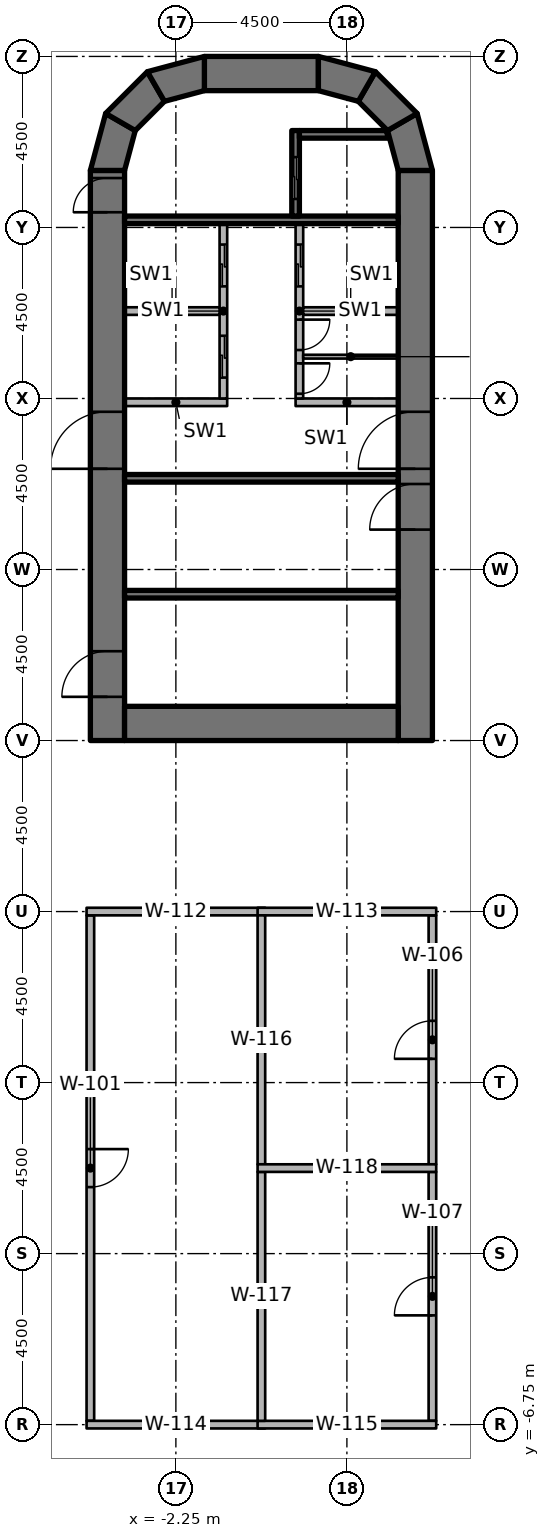
"""IFC4 building model, lengths in metres.
Left out: names, types, materials, properties, quantities, classifications, styles, units other than length and angle.
Written with IfcOpenShell. Run it as: python <this file> out.ifc"""

import sys

from ifc_helpers import new_model, si_unit, direction, frame, frame_2d, origin, place, context, subcontext, project, spatial, polyline, rectangle, outline, extrude, element, fill, save


model = new_model("IFC4")
c1 = context("Model", 3, precision=1e-05, world=origin(), true_north=direction((0.0, 1.0)))
c2 = subcontext(c1, "Body", "Model", "MODEL_VIEW")
j1 = project(units=[si_unit("LENGTHUNIT", "METRE"), si_unit("PLANEANGLEUNIT", "RADIAN")], contexts=[c1])
p1 = place(None, origin())
s1 = spatial("IfcSite", under=j1, at=p1, CompositionType="ELEMENT")
p2 = place(p1, origin())
s2 = spatial("IfcBuilding", under=s1, at=p2, CompositionType="ELEMENT")
p3 = place(p2, frame((0.0, 0.0, 27.0)))
s3 = spatial("IfcBuildingStorey", under=s2, at=p3, CompositionType="ELEMENT", Elevation=27.0)
p4 = place(p3, frame((-4.05, 11.25, 0.0), z_axis=(0.0, 0.0, 1.0), x_axis=(0.0, 1.0, 0.0)))
e1 = element("IfcWall", 1, at=p4, inside=s3, PredefinedType="SHEAR", context=c2, shape_type="SweptSolid", body=[
    extrude(rectangle(XDim=15.0, YDim=0.9, at=frame_2d((7.5, 0.0))), origin(), (0.0, 0.0, 1.0), 4.2),
])
p5 = place(p4, frame((7.15, 0.0, 0.0)))
e2 = element("IfcOpeningElement", 2, at=p5, cuts=e1, PredefinedType="OPENING", context=c2, shape_type="SweptSolid", body=[
    extrude(rectangle(XDim=1.5, YDim=2.3, at=frame_2d((0.75, 1.15))), frame((0.0, 0.46, 0.0), z_axis=(0.0, -1.0, 0.0), x_axis=(1.0, 0.0, 0.0)), (0.0, 0.0, 1.0), 0.92),
])
p6 = place(p4, frame((13.9, 0.0, 0.0)))
e3 = element("IfcOpeningElement", 3, at=p6, cuts=e1, PredefinedType="OPENING", context=c2, shape_type="SweptSolid", body=[
    extrude(rectangle(XDim=0.9, YDim=2.1, at=frame_2d((0.45, 1.05))), frame((0.0, 0.46, 0.0), z_axis=(0.0, -1.0, 0.0), x_axis=(1.0, 0.0, 0.0)), (0.0, 0.0, 1.0), 0.92),
])
p7 = place(p4, frame((1.15, 0.0, 0.0)))
e4 = element("IfcOpeningElement", 4, at=p7, cuts=e1, PredefinedType="OPENING", context=c2, shape_type="SweptSolid", body=[
    extrude(rectangle(XDim=1.2, YDim=2.1, at=frame_2d((0.6, 1.05))), frame((0.0, 0.46, 0.0), z_axis=(0.0, -1.0, 0.0), x_axis=(1.0, 0.0, 0.0)), (0.0, 0.0, 1.0), 0.92),
])
p8 = place(p3, frame((4.05, 11.25, 0.0), z_axis=(0.0, 0.0, 1.0), x_axis=(0.0, 1.0, 0.0)))
e5 = element("IfcWall", 5, at=p8, inside=s3, PredefinedType="SHEAR", context=c2, shape_type="SweptSolid", body=[
    extrude(rectangle(XDim=15.0, YDim=0.9, at=frame_2d((7.5, 0.0))), origin(), (0.0, 0.0, 1.0), 4.2),
])
p9 = place(p8, frame((7.15, 0.0, 0.0)))
e6 = element("IfcOpeningElement", 6, at=p9, cuts=e5, PredefinedType="OPENING", context=c2, shape_type="SweptSolid", body=[
    extrude(rectangle(XDim=1.5, YDim=2.3, at=frame_2d((0.75, 1.15))), frame((0.0, 0.46, 0.0), z_axis=(0.0, -1.0, 0.0), x_axis=(1.0, 0.0, 0.0)), (0.0, 0.0, 1.0), 0.92),
])
p10 = place(p8, frame((5.55, 0.0, 0.0)))
e7 = element("IfcOpeningElement", 7, at=p10, cuts=e5, PredefinedType="OPENING", context=c2, shape_type="SweptSolid", body=[
    extrude(rectangle(XDim=1.2, YDim=2.1, at=frame_2d((0.6, 1.05))), frame((0.0, 0.46, 0.0), z_axis=(0.0, -1.0, 0.0), x_axis=(1.0, 0.0, 0.0)), (0.0, 0.0, 1.0), 0.92),
])
p11 = place(p3, frame((-3.6, 11.7, 0.0), z_axis=(0.0, 0.0, 1.0), x_axis=(1.0, 0.0, 0.0)))
e8 = element("IfcWall", 8, at=p11, inside=s3, PredefinedType="SHEAR", context=c2, shape_type="SweptSolid", body=[
    extrude(rectangle(XDim=7.2, YDim=0.9, at=frame_2d((3.6, 0.0))), origin(), (0.0, 0.0, 1.0), 4.2),
])
p12 = place(p3, frame((-1.5, 28.8, 0.0), z_axis=(0.0, 0.0, 1.0), x_axis=(1.0, 0.0, 0.0)))
e9 = element("IfcWall", 9, at=p12, inside=s3, PredefinedType="SHEAR", context=c2, shape_type="SweptSolid", body=[
    extrude(rectangle(XDim=3.0, YDim=0.9, at=frame_2d((1.5, 0.0))), origin(), (0.0, 0.0, 1.0), 4.2),
])
p13 = place(p3, origin())
e10 = element("IfcWall", 10, at=p13, inside=s3, PredefinedType="SHEAR", context=c2, shape_type="SweptSolid", body=[
    extrude(outline(polyline([(-4.5, 26.25), (-4.098, 27.75), (-3.319, 27.3), (-3.6, 26.25), (-4.5, 26.25)])), origin(), (0.0, 0.0, 1.0), 4.2),
])
p14 = place(p3, origin())
e11 = element("IfcWall", 11, at=p14, inside=s3, PredefinedType="SHEAR", context=c2, shape_type="SweptSolid", body=[
    extrude(outline(polyline([(-4.098, 27.75), (-3.0, 28.848), (-2.55, 28.069), (-3.319, 27.3), (-4.098, 27.75)])), origin(), (0.0, 0.0, 1.0), 4.2),
])
p15 = place(p3, origin())
e12 = element("IfcWall", 12, at=p15, inside=s3, PredefinedType="SHEAR", context=c2, shape_type="SweptSolid", body=[
    extrude(outline(polyline([(-3.0, 28.848), (-1.5, 29.25), (-1.5, 28.35), (-2.55, 28.069), (-3.0, 28.848)])), origin(), (0.0, 0.0, 1.0), 4.2),
])
p16 = place(p3, origin())
e13 = element("IfcWall", 13, at=p16, inside=s3, PredefinedType="SHEAR", context=c2, shape_type="SweptSolid", body=[
    extrude(outline(polyline([(4.5, 26.25), (4.098, 27.75), (3.319, 27.3), (3.6, 26.25), (4.5, 26.25)])), origin(), (0.0, 0.0, 1.0), 4.2),
])
p17 = place(p3, origin())
e14 = element("IfcWall", 14, at=p17, inside=s3, PredefinedType="SHEAR", context=c2, shape_type="SweptSolid", body=[
    extrude(outline(polyline([(4.098, 27.75), (3.0, 28.848), (2.55, 28.069), (3.319, 27.3), (4.098, 27.75)])), origin(), (0.0, 0.0, 1.0), 4.2),
])
p18 = place(p3, origin())
e15 = element("IfcWall", 15, at=p18, inside=s3, PredefinedType="SHEAR", context=c2, shape_type="SweptSolid", body=[
    extrude(outline(polyline([(3.0, 28.848), (1.5, 29.25), (1.5, 28.35), (2.55, 28.069), (3.0, 28.848)])), origin(), (0.0, 0.0, 1.0), 4.2),
])
p19 = place(p3, frame((-3.6, 24.95, 0.0), z_axis=(0.0, 0.0, 1.0), x_axis=(1.0, 0.0, 0.0)))
e16 = element("IfcWall", 16, at=p19, inside=s3, PredefinedType="SHEAR", context=c2, shape_type="SweptSolid", body=[
    extrude(rectangle(XDim=7.2, YDim=0.2, at=frame_2d((3.6, 0.0))), origin(), (0.0, 0.0, 1.0), 4.05),
])
p20 = place(p3, frame((0.9, 27.3, 0.0), z_axis=(0.0, 0.0, 1.0), x_axis=(0.0, -1.0, 0.0)))
e17 = element("IfcWall", 17, at=p20, inside=s3, PredefinedType="SHEAR", context=c2, shape_type="SweptSolid", body=[
    extrude(rectangle(XDim=2.25, YDim=0.2, at=frame_2d((1.125, 0.0))), origin(), (0.0, 0.0, 1.0), 4.05),
])
p21 = place(p20, frame((0.7, 0.0, 0.0)))
e18 = element("IfcOpeningElement", 18, at=p21, cuts=e17, PredefinedType="OPENING", context=c2, shape_type="SweptSolid", body=[
    extrude(rectangle(XDim=1.1, YDim=2.3, at=frame_2d((0.55, 1.15))), frame((0.0, 0.11, 0.0), z_axis=(0.0, -1.0, 0.0), x_axis=(1.0, 0.0, 0.0)), (0.0, 0.0, 1.0), 0.22),
])
p22 = place(p3, origin())
e19 = element("IfcWall", 19, at=p22, inside=s3, PredefinedType="SHEAR", context=c2, shape_type="SweptSolid", body=[
    extrude(outline(polyline([(1.0, 27.1), (3.341, 27.1), (3.291, 27.284), (3.275, 27.3), (1.0, 27.3), (1.0, 27.1)])), origin(), (0.0, 0.0, 1.0), 4.05),
])
for number, where, z_axis, x_axis in (
    (20, (-3.6, 18.15, 0.0), (0.0, 0.0, 1.0), (1.0, 0.0, 0.0)),
    (21, (-3.6, 15.1, 0.0), (0.0, 0.0, 1.0), (1.0, 0.0, 0.0)),
):
    element("IfcWall", number, at=place(p3, frame(where, z_axis=z_axis, x_axis=x_axis)), inside=s3, PredefinedType="SHEAR", context=c2, shape_type="SweptSolid", body=[
        extrude(rectangle(XDim=7.2, YDim=0.2, at=frame_2d((3.6, 0.0))), origin(), (0.0, 0.0, 1.0), 4.05),
    ])
p23 = place(p3, frame((-3.6, 20.15, 0.0), z_axis=(0.0, 0.0, 1.0), x_axis=(1.0, 0.0, 0.0)))
e22 = element("IfcWall", 22, at=p23, inside=s3, PredefinedType="PARTITIONING", context=c2, shape_type="SweptSolid", body=[
    extrude(rectangle(XDim=2.7, YDim=0.2, at=frame_2d((1.35, 0.0))), origin(), (0.0, 0.0, 1.0), 4.05),
])
p24 = place(p3, frame((-1.0, 24.85, 0.0), z_axis=(0.0, 0.0, 1.0), x_axis=(0.0, -1.0, 0.0)))
e23 = element("IfcWall", 23, at=p24, inside=s3, PredefinedType="PARTITIONING", context=c2, shape_type="SweptSolid", body=[
    extrude(rectangle(XDim=4.6, YDim=0.2, at=frame_2d((2.3, 0.0))), origin(), (0.0, 0.0, 1.0), 4.05),
])
p25 = place(p24, frame((0.55, 0.0, 0.0)))
e24 = element("IfcOpeningElement", 24, at=p25, cuts=e23, PredefinedType="OPENING", context=c2, shape_type="SweptSolid", body=[
    extrude(rectangle(XDim=1.1, YDim=2.3, at=frame_2d((0.55, 1.15))), frame((0.0, 0.11, 0.0), z_axis=(0.0, -1.0, 0.0), x_axis=(1.0, 0.0, 0.0)), (0.0, 0.0, 1.0), 0.22),
])
p26 = place(p24, frame((2.95, 0.0, 0.0)))
e25 = element("IfcOpeningElement", 25, at=p26, cuts=e23, PredefinedType="OPENING", context=c2, shape_type="SweptSolid", body=[
    extrude(rectangle(XDim=1.1, YDim=2.3, at=frame_2d((0.55, 1.15))), frame((0.0, 0.11, 0.0), z_axis=(0.0, -1.0, 0.0), x_axis=(1.0, 0.0, 0.0)), (0.0, 0.0, 1.0), 0.22),
])
p27 = place(p3, frame((0.9, 20.15, 0.0), z_axis=(0.0, 0.0, 1.0), x_axis=(1.0, 0.0, 0.0)))
e26 = element("IfcWall", 26, at=p27, inside=s3, PredefinedType="PARTITIONING", context=c2, shape_type="SweptSolid", body=[
    extrude(rectangle(XDim=2.7, YDim=0.2, at=frame_2d((1.35, 0.0))), origin(), (0.0, 0.0, 1.0), 4.05),
])
p28 = place(p3, frame((1.0, 24.85, 0.0), z_axis=(0.0, 0.0, 1.0), x_axis=(0.0, -1.0, 0.0)))
e27 = element("IfcWall", 27, at=p28, inside=s3, PredefinedType="PARTITIONING", context=c2, shape_type="SweptSolid", body=[
    extrude(rectangle(XDim=4.6, YDim=0.2, at=frame_2d((2.3, 0.0))), origin(), (0.0, 0.0, 1.0), 4.05),
])
p29 = place(p28, frame((0.55, 0.0, 0.0)))
e28 = element("IfcOpeningElement", 28, at=p29, cuts=e27, PredefinedType="OPENING", context=c2, shape_type="SweptSolid", body=[
    extrude(rectangle(XDim=1.1, YDim=2.3, at=frame_2d((0.55, 1.15))), frame((0.0, 0.11, 0.0), z_axis=(0.0, -1.0, 0.0), x_axis=(1.0, 0.0, 0.0)), (0.0, 0.0, 1.0), 0.22),
])
p30 = place(p28, frame((2.525, 0.0, 0.0)))
e29 = element("IfcOpeningElement", 29, at=p30, cuts=e27, PredefinedType="OPENING", context=c2, shape_type="SweptSolid", body=[
    extrude(rectangle(XDim=0.8, YDim=2.1, at=frame_2d((0.4, 1.05))), frame((0.0, 0.11, 0.0), z_axis=(0.0, -1.0, 0.0), x_axis=(1.0, 0.0, 0.0)), (0.0, 0.0, 1.0), 0.22),
])
p31 = place(p28, frame((3.675, 0.0, 0.0)))
e30 = element("IfcOpeningElement", 30, at=p31, cuts=e27, PredefinedType="OPENING", context=c2, shape_type="SweptSolid", body=[
    extrude(rectangle(XDim=0.8, YDim=2.1, at=frame_2d((0.4, 1.05))), frame((0.0, 0.11, 0.0), z_axis=(0.0, -1.0, 0.0), x_axis=(1.0, 0.0, 0.0)), (0.0, 0.0, 1.0), 0.22),
])
for number, where, z_axis, x_axis in (
    (31, (-3.6, 22.55, 0.0), (0.0, 0.0, 1.0), (1.0, 0.0, 0.0)),
    (32, (1.1, 22.55, 0.0), (0.0, 0.0, 1.0), (1.0, 0.0, 0.0)),
):
    element("IfcWall", number, at=place(p3, frame(where, z_axis=z_axis, x_axis=x_axis)), inside=s3, PredefinedType="PARTITIONING", context=c2, shape_type="SweptSolid", body=[
        extrude(rectangle(XDim=2.5, YDim=0.2, at=frame_2d((1.25, 0.0))), origin(), (0.0, 0.0, 1.0), 4.05),
    ])
p32 = place(p3, frame((1.1, 21.35, 0.0), z_axis=(0.0, 0.0, 1.0), x_axis=(1.0, 0.0, 0.0)))
e33 = element("IfcWall", 33, at=p32, inside=s3, PredefinedType="PARTITIONING", context=c2, shape_type="SweptSolid", body=[
    extrude(rectangle(XDim=2.5, YDim=0.1, at=frame_2d((1.25, 0.0))), origin(), (0.0, 0.0, 1.0), 4.05),
])
p33 = place(p3, frame((-4.5, 6.65, 0.0), z_axis=(0.0, 0.0, 1.0), x_axis=(0.0, -1.0, 0.0)))
e34 = element("IfcWall", 34, at=p33, inside=s3, PredefinedType="PARTITIONING", context=c2, shape_type="SweptSolid", body=[
    extrude(rectangle(XDim=13.3, YDim=0.2, at=frame_2d((6.65, 0.0))), origin(), (0.0, 0.0, 1.0), 3.131),
])
p34 = place(p33, frame((6.15, 0.0, 0.0)))
e35 = element("IfcOpeningElement", 35, at=p34, cuts=e34, PredefinedType="OPENING", context=c2, shape_type="SweptSolid", body=[
    extrude(rectangle(XDim=1.0, YDim=2.1, at=frame_2d((0.5, 1.05))), frame((0.0, 0.11, 0.0), z_axis=(0.0, -1.0, 0.0), x_axis=(1.0, 0.0, 0.0)), (0.0, 0.0, 1.0), 0.22),
])
p35 = place(p3, frame((4.5, 0.1, 0.0), z_axis=(0.0, 0.0, 1.0), x_axis=(0.0, 1.0, 0.0)))
e36 = element("IfcWall", 36, at=p35, inside=s3, PredefinedType="PARTITIONING", context=c2, shape_type="SweptSolid", body=[
    extrude(rectangle(XDim=6.55, YDim=0.2, at=frame_2d((3.275, 0.0))), origin(), (0.0, 0.0, 1.0), 3.131),
])
p36 = place(p35, frame((2.775, 0.0, 0.0)))
e37 = element("IfcOpeningElement", 37, at=p36, cuts=e36, PredefinedType="OPENING", context=c2, shape_type="SweptSolid", body=[
    extrude(rectangle(XDim=1.0, YDim=2.1, at=frame_2d((0.5, 1.05))), frame((0.0, 0.11, 0.0), z_axis=(0.0, -1.0, 0.0), x_axis=(1.0, 0.0, 0.0)), (0.0, 0.0, 1.0), 0.22),
])
p37 = place(p3, frame((4.5, -6.65, 0.0), z_axis=(0.0, 0.0, 1.0), x_axis=(0.0, 1.0, 0.0)))
e38 = element("IfcWall", 38, at=p37, inside=s3, PredefinedType="PARTITIONING", context=c2, shape_type="SweptSolid", body=[
    extrude(rectangle(XDim=6.55, YDim=0.2, at=frame_2d((3.275, 0.0))), origin(), (0.0, 0.0, 1.0), 3.131),
])
p38 = place(p37, frame((2.775, 0.0, 0.0)))
e39 = element("IfcOpeningElement", 39, at=p38, cuts=e38, PredefinedType="OPENING", context=c2, shape_type="SweptSolid", body=[
    extrude(rectangle(XDim=1.0, YDim=2.1, at=frame_2d((0.5, 1.05))), frame((0.0, 0.11, 0.0), z_axis=(0.0, -1.0, 0.0), x_axis=(1.0, 0.0, 0.0)), (0.0, 0.0, 1.0), 0.22),
])
for number, where, z_axis, x_axis in (
    (40, (-4.6, 6.75, 0.0), (0.0, 0.0, 1.0), (1.0, 0.0, 0.0)),
    (41, (-0.1, 6.75, 0.0), (0.0, 0.0, 1.0), (1.0, 0.0, 0.0)),
    (42, (-4.6, -6.75, 0.0), (0.0, 0.0, 1.0), (1.0, 0.0, 0.0)),
    (43, (-0.1, -6.75, 0.0), (0.0, 0.0, 1.0), (1.0, 0.0, 0.0)),
):
    element("IfcWall", number, at=place(p3, frame(where, z_axis=z_axis, x_axis=x_axis)), inside=s3, PredefinedType="PARTITIONING", context=c2, shape_type="SweptSolid", body=[
        extrude(rectangle(XDim=4.7, YDim=0.2, at=frame_2d((2.35, 0.0))), origin(), (0.0, 0.0, 1.0), 3.131),
    ])
for number, where, z_axis, x_axis in (
    (44, (0.0, 0.1, 0.0), (0.0, 0.0, 1.0), (0.0, 1.0, 0.0)),
    (45, (0.0, -6.65, 0.0), (0.0, 0.0, 1.0), (0.0, 1.0, 0.0)),
):
    element("IfcWall", number, at=place(p3, frame(where, z_axis=z_axis, x_axis=x_axis)), inside=s3, PredefinedType="PARTITIONING", context=c2, shape_type="SweptSolid", body=[
        extrude(rectangle(XDim=6.55, YDim=0.2, at=frame_2d((3.275, 0.0))), origin(), (0.0, 0.0, 1.0), 3.131),
    ])
p39 = place(p3, frame((-0.1, 0.0, 0.0), z_axis=(0.0, 0.0, 1.0), x_axis=(1.0, 0.0, 0.0)))
e46 = element("IfcWall", 46, at=p39, inside=s3, PredefinedType="PARTITIONING", context=c2, shape_type="SweptSolid", body=[
    extrude(rectangle(XDim=4.7, YDim=0.2, at=frame_2d((2.35, 0.0))), origin(), (0.0, 0.0, 1.0), 3.131),
])
p40 = place(p5, origin())
e47 = element("IfcDoor", 47, at=p40, inside=s3, OperationType="DOUBLE_DOOR_SINGLE_SWING", PredefinedType="DOOR", context=c2, shape_type="SweptSolid", body=[
    extrude(rectangle(XDim=1.5, YDim=2.3, at=frame_2d((0.75, 1.15))), frame((0.0, 0.025, 0.0), z_axis=(0.0, -1.0, 0.0), x_axis=(1.0, 0.0, 0.0)), (0.0, 0.0, 1.0), 0.05),
])
fill(e2, e47)
p41 = place(p9, origin())
e48 = element("IfcDoor", 48, at=p41, inside=s3, OperationType="DOUBLE_DOOR_SINGLE_SWING", PredefinedType="DOOR", context=c2, shape_type="SweptSolid", body=[
    extrude(rectangle(XDim=1.5, YDim=2.3, at=frame_2d((0.75, 1.15))), frame((0.0, 0.025, 0.0), z_axis=(0.0, -1.0, 0.0), x_axis=(1.0, 0.0, 0.0)), (0.0, 0.0, 1.0), 0.05),
])
fill(e6, e48)
p42 = place(p6, origin())
e49 = element("IfcDoor", 49, at=p42, inside=s3, OperationType="SINGLE_SWING_LEFT", PredefinedType="DOOR", context=c2, shape_type="SweptSolid", body=[
    extrude(rectangle(XDim=0.9, YDim=2.1, at=frame_2d((0.45, 1.05))), frame((0.0, 0.025, 0.0), z_axis=(0.0, -1.0, 0.0), x_axis=(1.0, 0.0, 0.0)), (0.0, 0.0, 1.0), 0.05),
])
fill(e3, e49)
p43 = place(p10, origin())
e50 = element("IfcDoor", 50, at=p43, inside=s3, OperationType="SINGLE_SWING_LEFT", PredefinedType="DOOR", context=c2, shape_type="SweptSolid", body=[
    extrude(rectangle(XDim=1.2, YDim=2.1, at=frame_2d((0.6, 1.05))), frame((0.0, 0.025, 0.0), z_axis=(0.0, -1.0, 0.0), x_axis=(1.0, 0.0, 0.0)), (0.0, 0.0, 1.0), 0.05),
])
fill(e7, e50)
p44 = place(p7, origin())
e51 = element("IfcDoor", 51, at=p44, inside=s3, OperationType="SINGLE_SWING_LEFT", PredefinedType="DOOR", context=c2, shape_type="SweptSolid", body=[
    extrude(rectangle(XDim=1.2, YDim=2.1, at=frame_2d((0.6, 1.05))), frame((0.0, 0.025, 0.0), z_axis=(0.0, -1.0, 0.0), x_axis=(1.0, 0.0, 0.0)), (0.0, 0.0, 1.0), 0.05),
])
fill(e4, e51)
p45 = place(p21, origin())
e52 = element("IfcDoor", 52, at=p45, inside=s3, OperationType="DOUBLE_DOOR_SLIDING", PredefinedType="DOOR", context=c2, shape_type="SweptSolid", body=[
    extrude(rectangle(XDim=1.1, YDim=2.3, at=frame_2d((0.55, 1.15))), frame((0.0, 0.025, 0.0), z_axis=(0.0, -1.0, 0.0), x_axis=(1.0, 0.0, 0.0)), (0.0, 0.0, 1.0), 0.05),
])
fill(e18, e52)
p46 = place(p25, origin())
e53 = element("IfcDoor", 53, at=p46, inside=s3, OperationType="DOUBLE_DOOR_SLIDING", PredefinedType="DOOR", context=c2, shape_type="SweptSolid", body=[
    extrude(rectangle(XDim=1.1, YDim=2.3, at=frame_2d((0.55, 1.15))), frame((0.0, 0.025, 0.0), z_axis=(0.0, -1.0, 0.0), x_axis=(1.0, 0.0, 0.0)), (0.0, 0.0, 1.0), 0.05),
])
fill(e24, e53)
p47 = place(p26, origin())
e54 = element("IfcDoor", 54, at=p47, inside=s3, OperationType="DOUBLE_DOOR_SLIDING", PredefinedType="DOOR", context=c2, shape_type="SweptSolid", body=[
    extrude(rectangle(XDim=1.1, YDim=2.3, at=frame_2d((0.55, 1.15))), frame((0.0, 0.025, 0.0), z_axis=(0.0, -1.0, 0.0), x_axis=(1.0, 0.0, 0.0)), (0.0, 0.0, 1.0), 0.05),
])
fill(e25, e54)
p48 = place(p29, origin())
e55 = element("IfcDoor", 55, at=p48, inside=s3, OperationType="DOUBLE_DOOR_SLIDING", PredefinedType="DOOR", context=c2, shape_type="SweptSolid", body=[
    extrude(rectangle(XDim=1.1, YDim=2.3, at=frame_2d((0.55, 1.15))), frame((0.0, 0.025, 0.0), z_axis=(0.0, -1.0, 0.0), x_axis=(1.0, 0.0, 0.0)), (0.0, 0.0, 1.0), 0.05),
])
fill(e28, e55)
p49 = place(p30, origin())
e56 = element("IfcDoor", 56, at=p49, inside=s3, OperationType="SINGLE_SWING_LEFT", PredefinedType="DOOR", context=c2, shape_type="SweptSolid", body=[
    extrude(rectangle(XDim=0.8, YDim=2.1, at=frame_2d((0.4, 1.05))), frame((0.0, 0.025, 0.0), z_axis=(0.0, -1.0, 0.0), x_axis=(1.0, 0.0, 0.0)), (0.0, 0.0, 1.0), 0.05),
])
fill(e29, e56)
p50 = place(p31, origin())
e57 = element("IfcDoor", 57, at=p50, inside=s3, OperationType="SINGLE_SWING_RIGHT", PredefinedType="DOOR", context=c2, shape_type="SweptSolid", body=[
    extrude(rectangle(XDim=0.8, YDim=2.1, at=frame_2d((0.4, 1.05))), frame((0.0, 0.025, 0.0), z_axis=(0.0, -1.0, 0.0), x_axis=(1.0, 0.0, 0.0)), (0.0, 0.0, 1.0), 0.05),
])
fill(e30, e57)
p51 = place(p36, origin())
e58 = element("IfcDoor", 58, at=p51, inside=s3, OperationType="SINGLE_SWING_LEFT", PredefinedType="DOOR", context=c2, shape_type="SweptSolid", body=[
    extrude(rectangle(XDim=1.0, YDim=2.1, at=frame_2d((0.5, 1.05))), frame((0.0, 0.025, 0.0), z_axis=(0.0, -1.0, 0.0), x_axis=(1.0, 0.0, 0.0)), (0.0, 0.0, 1.0), 0.05),
])
fill(e37, e58)
p52 = place(p38, origin())
e59 = element("IfcDoor", 59, at=p52, inside=s3, OperationType="SINGLE_SWING_RIGHT", PredefinedType="DOOR", context=c2, shape_type="SweptSolid", body=[
    extrude(rectangle(XDim=1.0, YDim=2.1, at=frame_2d((0.5, 1.05))), frame((0.0, 0.025, 0.0), z_axis=(0.0, -1.0, 0.0), x_axis=(1.0, 0.0, 0.0)), (0.0, 0.0, 1.0), 0.05),
])
fill(e39, e59)
p53 = place(p34, origin())
e60 = element("IfcDoor", 60, at=p53, inside=s3, OperationType="SINGLE_SWING_RIGHT", PredefinedType="DOOR", context=c2, shape_type="SweptSolid", body=[
    extrude(rectangle(XDim=1.0, YDim=2.1, at=frame_2d((0.5, 1.05))), frame((0.0, 0.025, 0.0), z_axis=(0.0, -1.0, 0.0), x_axis=(1.0, 0.0, 0.0)), (0.0, 0.0, 1.0), 0.05),
])
fill(e35, e60)
save(model, sys.argv[1])
